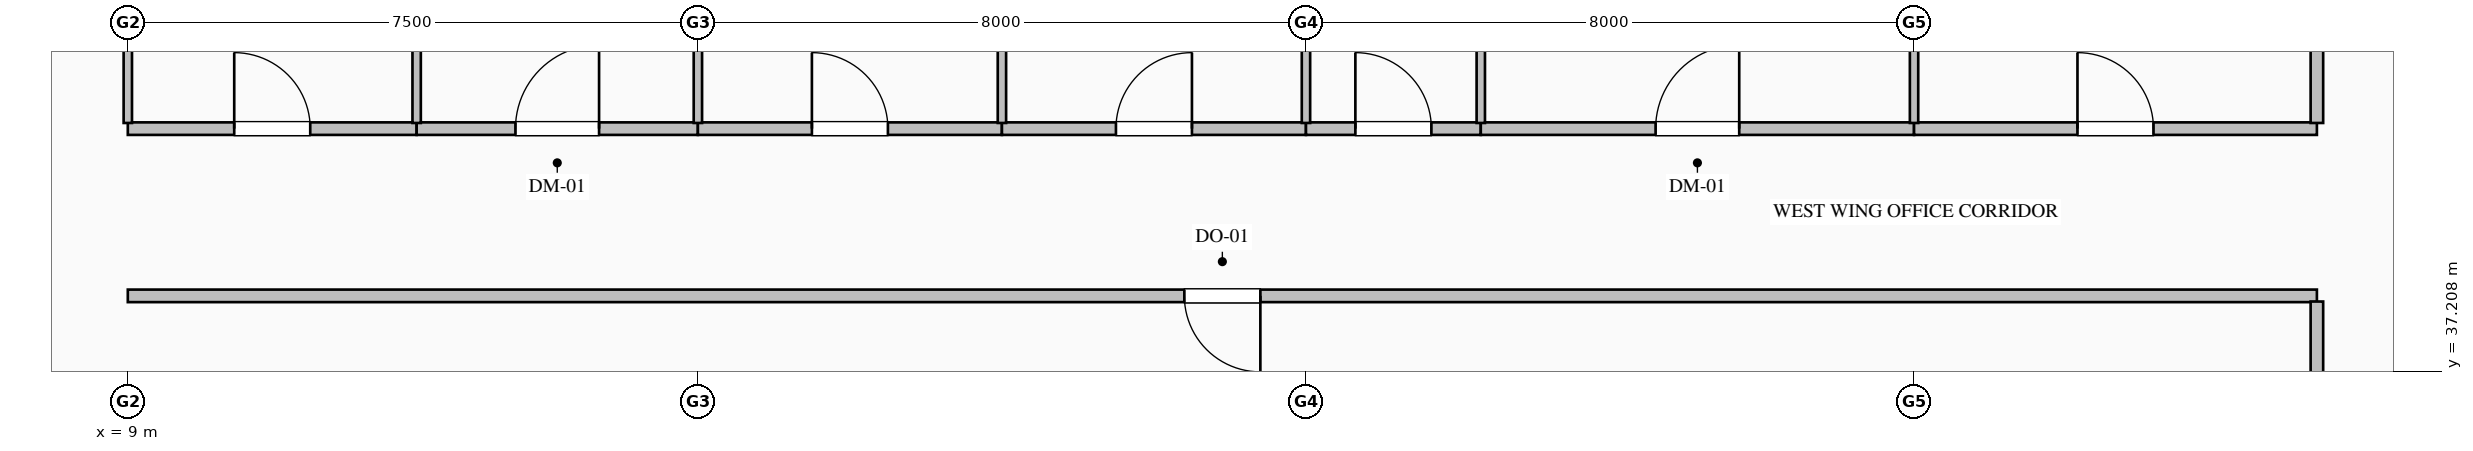
"""IFC4 building model, lengths in metres.
Left out: names, types, materials, properties, quantities, classifications, styles, units other than length and angle.
Written with IfcOpenShell. Run it as: python <this file> out.ifc"""

import sys

from ifc_helpers import new_model, si_unit, direction, frame, frame_2d, origin, place, context, subcontext, project, spatial, rectangle, extrude, element, fill, save


model = new_model("IFC4")
c1 = context("Model", 3, precision=1e-05, world=origin(), true_north=direction((0.0, 1.0)))
c2 = subcontext(c1, "Body", "Model", "MODEL_VIEW")
j1 = project(units=[si_unit("LENGTHUNIT", "METRE"), si_unit("PLANEANGLEUNIT", "RADIAN")], contexts=[c1])
p1 = place(None, origin())
s1 = spatial("IfcSite", under=j1, at=p1, CompositionType="ELEMENT")
p2 = place(p1, origin())
s2 = spatial("IfcBuilding", under=s1, at=p2, CompositionType="ELEMENT")
p3 = place(p2, frame((0.0, 0.0, 40.2)))
s3 = spatial("IfcBuildingStorey", under=s2, at=p3, CompositionType="ELEMENT", Elevation=40.2)
p4 = place(p3, frame((37.8, 38.2, 0.0), z_axis=(0.0, 0.0, 1.0), x_axis=(-1.0, 0.0, 0.0)))
e1 = element("IfcWall", 1, at=p4, inside=s3, PredefinedType="PARTITIONING", context=c2, shape_type="SweptSolid", body=[
    extrude(rectangle(XDim=28.8, YDim=0.165, at=frame_2d((14.4, 0.0))), origin(), (0.0, 0.0, 1.0), 3.75),
])
p5 = place(p4, frame((13.9, 0.0, 0.0)))
e2 = element("IfcOpeningElement", 2, at=p5, cuts=e1, PredefinedType="OPENING", context=c2, shape_type="SweptSolid", body=[
    extrude(rectangle(XDim=1.0, YDim=2.15, at=frame_2d((0.5, 1.075))), frame((0.0, 0.093, 0.0), z_axis=(0.0, -1.0, 0.0), x_axis=(1.0, 0.0, 0.0)), (0.0, 0.0, 1.0), 0.185),
])
p6 = place(p3, frame((9.0, 40.4, 0.0), z_axis=(0.0, 0.0, 1.0), x_axis=(1.0, 0.0, 0.0)))
e3 = element("IfcWall", 3, at=p6, inside=s3, PredefinedType="PARTITIONING", context=c2, shape_type="SweptSolid", body=[
    extrude(rectangle(XDim=3.8, YDim=0.165, at=frame_2d((1.9, 0.0))), origin(), (0.0, 0.0, 1.0), 3.75),
])
p7 = place(p6, frame((1.4, 0.0, 0.0)))
e4 = element("IfcOpeningElement", 4, at=p7, cuts=e3, PredefinedType="OPENING", context=c2, shape_type="SweptSolid", body=[
    extrude(rectangle(XDim=1.0, YDim=2.15, at=frame_2d((0.5, 1.075))), frame((0.0, 0.093, 0.0), z_axis=(0.0, -1.0, 0.0), x_axis=(1.0, 0.0, 0.0)), (0.0, 0.0, 1.0), 0.185),
])
p8 = place(p3, frame((12.8, 40.4, 0.0), z_axis=(0.0, 0.0, 1.0), x_axis=(1.0, 0.0, 0.0)))
e5 = element("IfcWall", 5, at=p8, inside=s3, PredefinedType="PARTITIONING", context=c2, shape_type="SweptSolid", body=[
    extrude(rectangle(XDim=3.7, YDim=0.165, at=frame_2d((1.85, 0.0))), origin(), (0.0, 0.0, 1.0), 3.75),
])
p9 = place(p8, frame((1.3, 0.0, 0.0)))
e6 = element("IfcOpeningElement", 6, at=p9, cuts=e5, PredefinedType="OPENING", context=c2, shape_type="SweptSolid", body=[
    extrude(rectangle(XDim=1.1, YDim=2.2, at=frame_2d((0.55, 1.1))), frame((0.0, 0.093, 0.0), z_axis=(0.0, -1.0, 0.0), x_axis=(1.0, 0.0, 0.0)), (0.0, 0.0, 1.0), 0.185),
])
p10 = place(p3, frame((16.5, 40.4, 0.0), z_axis=(0.0, 0.0, 1.0), x_axis=(1.0, 0.0, 0.0)))
e7 = element("IfcWall", 7, at=p10, inside=s3, PredefinedType="PARTITIONING", context=c2, shape_type="SweptSolid", body=[
    extrude(rectangle(XDim=4.0, YDim=0.165, at=frame_2d((2.0, 0.0))), origin(), (0.0, 0.0, 1.0), 3.75),
])
p11 = place(p10, frame((1.5, 0.0, 0.0)))
e8 = element("IfcOpeningElement", 8, at=p11, cuts=e7, PredefinedType="OPENING", context=c2, shape_type="SweptSolid", body=[
    extrude(rectangle(XDim=1.0, YDim=2.15, at=frame_2d((0.5, 1.075))), frame((0.0, 0.093, 0.0), z_axis=(0.0, -1.0, 0.0), x_axis=(1.0, 0.0, 0.0)), (0.0, 0.0, 1.0), 0.185),
])
p12 = place(p3, frame((20.5, 40.4, 0.0), z_axis=(0.0, 0.0, 1.0), x_axis=(1.0, 0.0, 0.0)))
e9 = element("IfcWall", 9, at=p12, inside=s3, PredefinedType="PARTITIONING", context=c2, shape_type="SweptSolid", body=[
    extrude(rectangle(XDim=4.0, YDim=0.165, at=frame_2d((2.0, 0.0))), origin(), (0.0, 0.0, 1.0), 3.75),
])
p13 = place(p12, frame((1.5, 0.0, 0.0)))
e10 = element("IfcOpeningElement", 10, at=p13, cuts=e9, PredefinedType="OPENING", context=c2, shape_type="SweptSolid", body=[
    extrude(rectangle(XDim=1.0, YDim=2.15, at=frame_2d((0.5, 1.075))), frame((0.0, 0.093, 0.0), z_axis=(0.0, -1.0, 0.0), x_axis=(1.0, 0.0, 0.0)), (0.0, 0.0, 1.0), 0.185),
])
p14 = place(p3, frame((24.5, 40.4, 0.0), z_axis=(0.0, 0.0, 1.0), x_axis=(1.0, 0.0, 0.0)))
e11 = element("IfcWall", 11, at=p14, inside=s3, PredefinedType="PARTITIONING", context=c2, shape_type="SweptSolid", body=[
    extrude(rectangle(XDim=2.3, YDim=0.165, at=frame_2d((1.15, 0.0))), origin(), (0.0, 0.0, 1.0), 3.75),
])
p15 = place(p14, frame((0.65, 0.0, 0.0)))
e12 = element("IfcOpeningElement", 12, at=p15, cuts=e11, PredefinedType="OPENING", context=c2, shape_type="SweptSolid", body=[
    extrude(rectangle(XDim=1.0, YDim=2.15, at=frame_2d((0.5, 1.075))), frame((0.0, 0.093, 0.0), z_axis=(0.0, -1.0, 0.0), x_axis=(1.0, 0.0, 0.0)), (0.0, 0.0, 1.0), 0.185),
])
p16 = place(p3, frame((26.8, 40.4, 0.0), z_axis=(0.0, 0.0, 1.0), x_axis=(1.0, 0.0, 0.0)))
e13 = element("IfcWall", 13, at=p16, inside=s3, PredefinedType="PARTITIONING", context=c2, shape_type="SweptSolid", body=[
    extrude(rectangle(XDim=5.7, YDim=0.165, at=frame_2d((2.85, 0.0))), origin(), (0.0, 0.0, 1.0), 3.75),
])
p17 = place(p16, frame((2.3, 0.0, 0.0)))
e14 = element("IfcOpeningElement", 14, at=p17, cuts=e13, PredefinedType="OPENING", context=c2, shape_type="SweptSolid", body=[
    extrude(rectangle(XDim=1.1, YDim=2.2, at=frame_2d((0.55, 1.1))), frame((0.0, 0.093, 0.0), z_axis=(0.0, -1.0, 0.0), x_axis=(1.0, 0.0, 0.0)), (0.0, 0.0, 1.0), 0.185),
])
p18 = place(p3, frame((32.5, 40.4, 0.0), z_axis=(0.0, 0.0, 1.0), x_axis=(1.0, 0.0, 0.0)))
e15 = element("IfcWall", 15, at=p18, inside=s3, PredefinedType="PARTITIONING", context=c2, shape_type="SweptSolid", body=[
    extrude(rectangle(XDim=5.3, YDim=0.165, at=frame_2d((2.65, 0.0))), origin(), (0.0, 0.0, 1.0), 3.75),
])
p19 = place(p18, frame((2.15, 0.0, 0.0)))
e16 = element("IfcOpeningElement", 16, at=p19, cuts=e15, PredefinedType="OPENING", context=c2, shape_type="SweptSolid", body=[
    extrude(rectangle(XDim=1.0, YDim=2.15, at=frame_2d((0.5, 1.075))), frame((0.0, 0.093, 0.0), z_axis=(0.0, -1.0, 0.0), x_axis=(1.0, 0.0, 0.0)), (0.0, 0.0, 1.0), 0.185),
])
p20 = place(p3, frame((37.8, 31.6, 0.0), z_axis=(0.0, 0.0, 1.0), x_axis=(0.0, 1.0, 0.0)))
e17 = element("IfcWall", 17, at=p20, inside=s3, PredefinedType="PARTITIONING", context=c2, shape_type="SweptSolid", body=[
    extrude(rectangle(XDim=6.525, YDim=0.165, at=frame_2d((3.263, 0.0))), origin(), (0.0, 0.0, 1.0), 3.75),
])
p21 = place(p3, frame((37.8, 40.475, 0.0), z_axis=(0.0, 0.0, 1.0), x_axis=(0.0, 1.0, 0.0)))
e18 = element("IfcWall", 18, at=p21, inside=s3, PredefinedType="PARTITIONING", context=c2, shape_type="SweptSolid", body=[
    extrude(rectangle(XDim=3.651, YDim=0.165, at=frame_2d((1.825, 0.0))), origin(), (0.0, 0.0, 1.0), 3.75),
])
p22 = place(p3, frame((9.0, 51.668, 0.0), z_axis=(0.0, 0.0, 1.0), x_axis=(0.0, -1.0, 0.0)))
e19 = element("IfcWall", 19, at=p22, inside=s3, PredefinedType="MOVABLE", context=c2, shape_type="SweptSolid", body=[
    extrude(rectangle(XDim=11.193, YDim=0.11, at=frame_2d((5.597, 0.0))), origin(), (0.0, 0.0, 1.0), 3.042),
])
p23 = place(p22, frame((5.097, 0.0, 0.0)))
e20 = element("IfcOpeningElement", 20, at=p23, cuts=e19, PredefinedType="OPENING", context=c2, shape_type="SweptSolid", body=[
    extrude(rectangle(XDim=1.0, YDim=2.15, at=frame_2d((0.5, 1.075))), frame((0.0, 0.065, 0.0), z_axis=(0.0, -1.0, 0.0), x_axis=(1.0, 0.0, 0.0)), (0.0, 0.0, 1.0), 0.13),
])
p24 = place(p3, frame((12.8, 51.668, 0.0), z_axis=(0.0, 0.0, 1.0), x_axis=(0.0, -1.0, 0.0)))
e21 = element("IfcWall", 21, at=p24, inside=s3, PredefinedType="MOVABLE", context=c2, shape_type="SweptSolid", body=[
    extrude(rectangle(XDim=11.193, YDim=0.11, at=frame_2d((5.597, 0.0))), origin(), (0.0, 0.0, 1.0), 3.75),
])
p25 = place(p3, frame((16.5, 51.668, 0.0), z_axis=(0.0, 0.0, 1.0), x_axis=(0.0, -1.0, 0.0)))
e22 = element("IfcWall", 22, at=p25, inside=s3, PredefinedType="MOVABLE", context=c2, shape_type="SweptSolid", body=[
    extrude(rectangle(XDim=11.193, YDim=0.11, at=frame_2d((5.597, 0.0))), origin(), (0.0, 0.0, 1.0), 3.042),
])
p26 = place(p3, frame((20.5, 51.668, 0.0), z_axis=(0.0, 0.0, 1.0), x_axis=(0.0, -1.0, 0.0)))
e23 = element("IfcWall", 23, at=p26, inside=s3, PredefinedType="MOVABLE", context=c2, shape_type="SweptSolid", body=[
    extrude(rectangle(XDim=11.193, YDim=0.11, at=frame_2d((5.597, 0.0))), origin(), (0.0, 0.0, 1.0), 3.75),
])
p27 = place(p3, frame((24.5, 51.668, 0.0), z_axis=(0.0, 0.0, 1.0), x_axis=(0.0, -1.0, 0.0)))
e24 = element("IfcWall", 24, at=p27, inside=s3, PredefinedType="MOVABLE", context=c2, shape_type="SweptSolid", body=[
    extrude(rectangle(XDim=11.193, YDim=0.11, at=frame_2d((5.597, 0.0))), origin(), (0.0, 0.0, 1.0), 3.042),
])
for number, where, z_axis, x_axis in (
    (25, (26.8, 51.668, 0.0), (0.0, 0.0, 1.0), (0.0, -1.0, 0.0)),
    (26, (32.5, 51.668, 0.0), (0.0, 0.0, 1.0), (0.0, -1.0, 0.0)),
):
    element("IfcWall", number, at=place(p3, frame(where, z_axis=z_axis, x_axis=x_axis)), inside=s3, PredefinedType="MOVABLE", context=c2, shape_type="SweptSolid", body=[
        extrude(rectangle(XDim=11.193, YDim=0.11, at=frame_2d((5.597, 0.0))), origin(), (0.0, 0.0, 1.0), 3.75),
    ])
p28 = place(p5, origin())
e27 = element("IfcDoor", 27, at=p28, inside=s3, OperationType="SINGLE_SWING_LEFT", PredefinedType="DOOR", context=c2, shape_type="SweptSolid", body=[
    extrude(rectangle(XDim=1.0, YDim=2.15, at=frame_2d((0.5, 1.075))), frame((0.0, 0.025, 0.0), z_axis=(0.0, -1.0, 0.0), x_axis=(1.0, 0.0, 0.0)), (0.0, 0.0, 1.0), 0.05),
])
fill(e2, e27)
p29 = place(p7, origin())
e28 = element("IfcDoor", 28, at=p29, inside=s3, OperationType="SINGLE_SWING_LEFT", PredefinedType="DOOR", context=c2, shape_type="SweptSolid", body=[
    extrude(rectangle(XDim=1.0, YDim=2.15, at=frame_2d((0.5, 1.075))), frame((0.0, 0.025, 0.0), z_axis=(0.0, -1.0, 0.0), x_axis=(1.0, 0.0, 0.0)), (0.0, 0.0, 1.0), 0.05),
])
fill(e4, e28)
p30 = place(p9, origin())
e29 = element("IfcDoor", 29, at=p30, inside=s3, OperationType="SINGLE_SWING_RIGHT", PredefinedType="DOOR", context=c2, shape_type="SweptSolid", body=[
    extrude(rectangle(XDim=1.1, YDim=2.2, at=frame_2d((0.55, 1.1))), frame((0.0, 0.025, 0.0), z_axis=(0.0, -1.0, 0.0), x_axis=(1.0, 0.0, 0.0)), (0.0, 0.0, 1.0), 0.05),
])
fill(e6, e29)
p31 = place(p11, origin())
e30 = element("IfcDoor", 30, at=p31, inside=s3, OperationType="SINGLE_SWING_LEFT", PredefinedType="DOOR", context=c2, shape_type="SweptSolid", body=[
    extrude(rectangle(XDim=1.0, YDim=2.15, at=frame_2d((0.5, 1.075))), frame((0.0, 0.025, 0.0), z_axis=(0.0, -1.0, 0.0), x_axis=(1.0, 0.0, 0.0)), (0.0, 0.0, 1.0), 0.05),
])
fill(e8, e30)
p32 = place(p13, origin())
e31 = element("IfcDoor", 31, at=p32, inside=s3, OperationType="SINGLE_SWING_RIGHT", PredefinedType="DOOR", context=c2, shape_type="SweptSolid", body=[
    extrude(rectangle(XDim=1.0, YDim=2.15, at=frame_2d((0.5, 1.075))), frame((0.0, 0.025, 0.0), z_axis=(0.0, -1.0, 0.0), x_axis=(1.0, 0.0, 0.0)), (0.0, 0.0, 1.0), 0.05),
])
fill(e10, e31)
p33 = place(p15, origin())
e32 = element("IfcDoor", 32, at=p33, inside=s3, OperationType="SINGLE_SWING_LEFT", PredefinedType="DOOR", context=c2, shape_type="SweptSolid", body=[
    extrude(rectangle(XDim=1.0, YDim=2.15, at=frame_2d((0.5, 1.075))), frame((0.0, 0.025, 0.0), z_axis=(0.0, -1.0, 0.0), x_axis=(1.0, 0.0, 0.0)), (0.0, 0.0, 1.0), 0.05),
])
fill(e12, e32)
p34 = place(p17, origin())
e33 = element("IfcDoor", 33, at=p34, inside=s3, OperationType="SINGLE_SWING_RIGHT", PredefinedType="DOOR", context=c2, shape_type="SweptSolid", body=[
    extrude(rectangle(XDim=1.1, YDim=2.2, at=frame_2d((0.55, 1.1))), frame((0.0, 0.025, 0.0), z_axis=(0.0, -1.0, 0.0), x_axis=(1.0, 0.0, 0.0)), (0.0, 0.0, 1.0), 0.05),
])
fill(e14, e33)
p35 = place(p19, origin())
e34 = element("IfcDoor", 34, at=p35, inside=s3, OperationType="SINGLE_SWING_LEFT", PredefinedType="DOOR", context=c2, shape_type="SweptSolid", body=[
    extrude(rectangle(XDim=1.0, YDim=2.15, at=frame_2d((0.5, 1.075))), frame((0.0, 0.025, 0.0), z_axis=(0.0, -1.0, 0.0), x_axis=(1.0, 0.0, 0.0)), (0.0, 0.0, 1.0), 0.05),
])
fill(e16, e34)
save(model, sys.argv[1])
